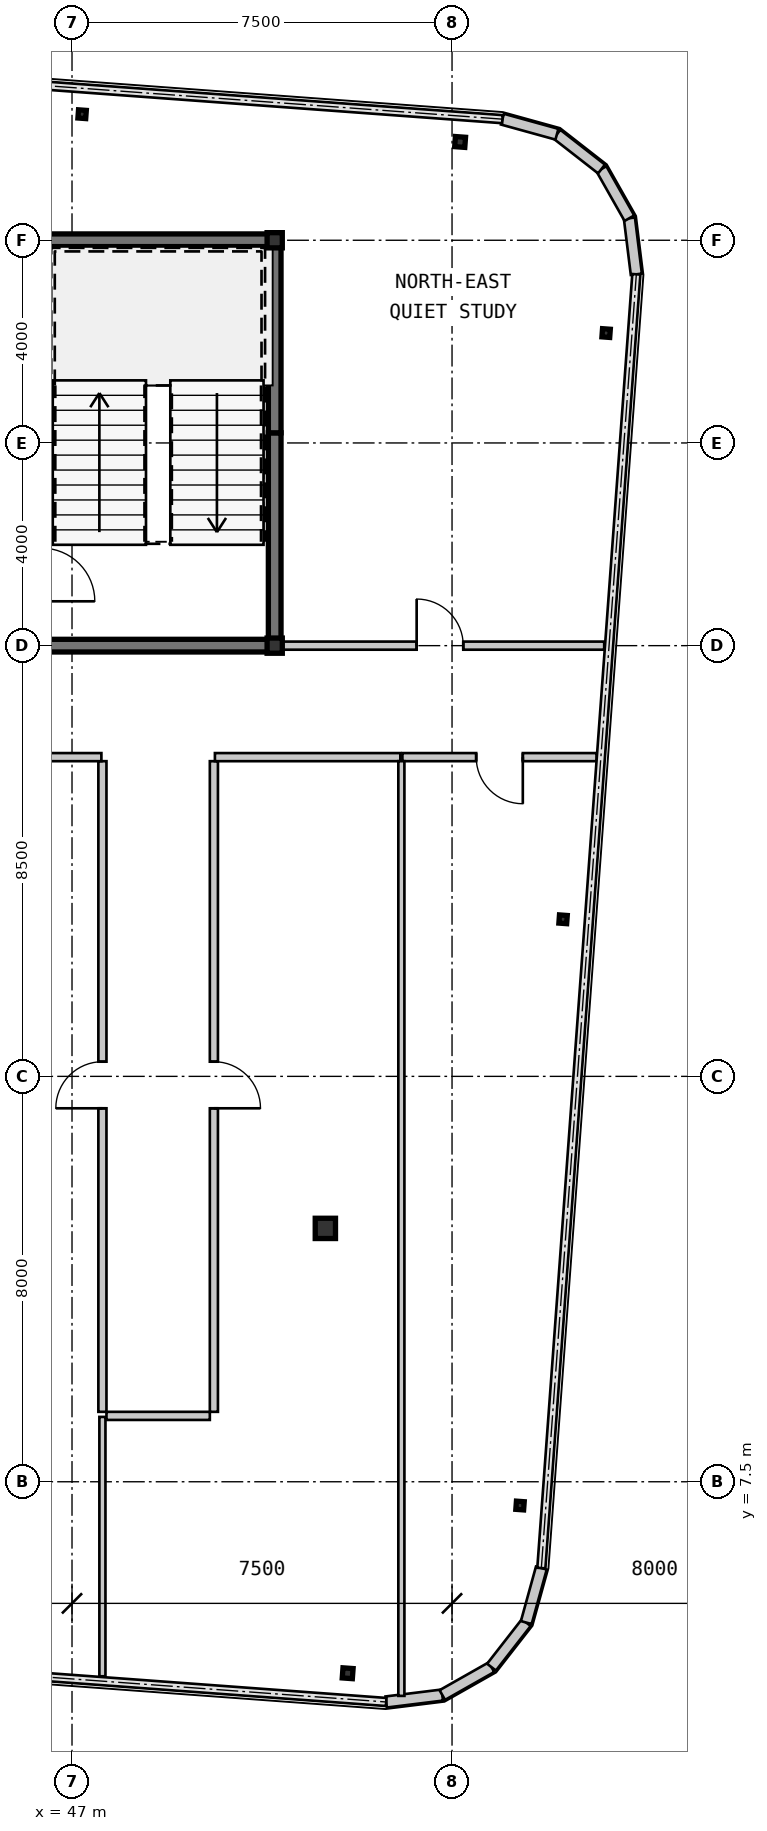
"""IFC4 building model, lengths in metres.
Left out: names, types, materials, properties, quantities, classifications, styles, units other than length and angle.
Written with IfcOpenShell. Run it as: python <this file> out.ifc"""

import sys

from ifc_helpers import new_model, si_unit, direction, frame, frame_2d, origin, origin_2d, place, context, subcontext, project, spatial, rectangle, hollow_rectangle, i_section, extrude, source, transform, mapped, element, fill, save


model = new_model("IFC4")
c1 = context("Model", 3, precision=1e-05, world=origin(), true_north=direction((0.0, 1.0)))
c2 = subcontext(c1, "Body", "Model", "MODEL_VIEW")
j1 = project(units=[si_unit("LENGTHUNIT", "METRE"), si_unit("PLANEANGLEUNIT", "RADIAN")], contexts=[c1])
p1 = place(None, origin())
s1 = spatial("IfcSite", under=j1, at=p1, CompositionType="ELEMENT")
p2 = place(p1, origin())
s2 = spatial("IfcBuilding", under=s1, at=p2, CompositionType="ELEMENT")
p3 = place(p2, frame((0.0, 0.0, 214.55)))
s3 = spatial("IfcBuildingStorey", under=s2, at=p3, CompositionType="ELEMENT", Elevation=214.55)
m1 = source(origin(), c2, "Body", "SweptSolid", [
    extrude(hollow_rectangle(XDim=0.3, YDim=0.3, WallThickness=0.012, at=origin_2d()), origin(), (0.0, 0.0, 1.0), 3.15),
])
for number, where, z_axis, x_axis in (
    (1, (51.0, 24.0, 0.0), (0.0, 0.0, 1.0), (1.0, 0.0, 0.0)),
    (2, (51.0, 32.0, 0.0), (0.0, 0.0, 1.0), (1.0, 0.0, 0.0)),
):
    element("IfcColumn", number, at=place(p3, frame(where, z_axis=z_axis, x_axis=x_axis)), inside=s3, PredefinedType="COLUMN", context=c2, shape_type="MappedRepresentation", body=[
        mapped(m1, transform((0.0, 0.0, 0.0), scale=1.0)),
    ])
m2 = source(origin(), c2, "Body", "SweptSolid", [
    extrude(hollow_rectangle(XDim=0.4, YDim=0.4, WallThickness=0.016, at=origin_2d()), origin(), (0.0, 0.0, 1.0), 3.15),
])
p4 = place(p3, frame((52.0, 12.5, 0.0), z_axis=(0.0, 0.0, 1.0), x_axis=(1.0, 0.0, 0.0)))
e3 = element("IfcColumn", 3, at=p4, inside=s3, PredefinedType="COLUMN", context=c2, shape_type="MappedRepresentation", body=[
    mapped(m2, transform((0.0, 0.0, 0.0), scale=1.0)),
])
m3 = source(origin(), c2, "Body", "SweptSolid", [
    extrude(hollow_rectangle(XDim=0.2, YDim=0.2, WallThickness=0.009, at=origin_2d()), origin(), (0.0, 0.0, 1.0), 3.15),
])
p5 = place(p3, frame((52.44, 3.721, 0.0), z_axis=(0.0, 0.0, 1.0), x_axis=(0.997314477224, -0.073238197128, 0.0)))
e4 = element("IfcColumn", 4, at=p5, inside=s3, PredefinedType="COLUMN", context=c2, shape_type="MappedRepresentation", body=[
    mapped(m3, transform((0.0, 0.0, 0.0), scale=1.0)),
])
m4 = source(origin(), c2, "Body", "SweptSolid", [
    extrude(i_section(OverallWidth=0.154, OverallDepth=0.162, WebThickness=0.008, FlangeThickness=0.011, at=origin_2d()), origin(), (0.0, 0.0, 1.0), 3.15),
])
p6 = place(p3, frame((47.199, 34.488, 0.0), z_axis=(0.0, 0.0, 1.0), x_axis=(0.997314477224, -0.073238197128, 0.0)))
e5 = element("IfcColumn", 5, at=p6, inside=s3, PredefinedType="COLUMN", context=c2, shape_type="MappedRepresentation", body=[
    mapped(m4, transform((0.0, 0.0, 0.0), scale=1.0)),
])
p7 = place(p3, frame((54.659, 33.94, 0.0), z_axis=(0.0, 0.0, 1.0), x_axis=(0.997314477224, -0.073238197128, 0.0)))
e6 = element("IfcColumn", 6, at=p7, inside=s3, PredefinedType="COLUMN", context=c2, shape_type="MappedRepresentation", body=[
    mapped(m3, transform((0.0, 0.0, 0.0), scale=1.0)),
])
for number, where, z_axis, x_axis in (
    (7, (55.842, 7.031, 0.0), (0.0, 0.0, 1.0), (0.997, -0.073, 0.0)),
    (8, (56.691, 18.6, 0.0), (0.0, 0.0, 1.0), (0.997, -0.073, 0.0)),
    (9, (57.541, 30.169, 0.0), (0.0, 0.0, 1.0), (0.997, -0.073, 0.0)),
):
    element("IfcColumn", number, at=place(p3, frame(where, z_axis=z_axis, x_axis=x_axis)), inside=s3, PredefinedType="COLUMN", context=c2, shape_type="MappedRepresentation", body=[
        mapped(m4, transform((0.0, 0.0, 0.0), scale=1.0)),
    ])
m5 = source(origin(), c2, "Body", "SweptSolid", [
    extrude(rectangle(XDim=1.116, YDim=0.22, at=frame_2d((0.558, 0.0))), origin(), (0.0, 0.0, 1.0), 2.93),
])
p8 = place(p3, frame((53.201, 3.154, 0.0), z_axis=(0.0, 0.0, 1.0), x_axis=(0.992438604032, 0.122742076028, 0.0)))
e10 = element("IfcWall", 10, at=p8, inside=s3, PredefinedType="SOLIDWALL", context=c2, shape_type="MappedRepresentation", body=[
    mapped(m5, transform((0.0, 0.0, 0.0), scale=1.0)),
])
m6 = source(origin(), c2, "Body", "SweptSolid", [
    extrude(rectangle(XDim=1.116, YDim=0.22, at=frame_2d((0.558, 0.0))), origin(), (0.0, 0.0, 1.0), 2.93),
])
p9 = place(p3, frame((54.308, 3.291, 0.0), z_axis=(0.0, 0.0, 1.0), x_axis=(0.869893934693, 0.49323882895, 0.0)))
e11 = element("IfcWall", 11, at=p9, inside=s3, PredefinedType="SOLIDWALL", context=c2, shape_type="MappedRepresentation", body=[
    mapped(m6, transform((0.0, 0.0, 0.0), scale=1.0)),
])
for number, where, z_axis, x_axis in (
    (12, (55.279, 3.841, 0.0), (0.0, 0.0, 1.0), (0.615, 0.789, 0.0)),
    (13, (55.965, 4.721, 0.0), (0.0, 0.0, 1.0), (0.266, 0.964, 0.0)),
    (14, (58.137, 31.328, 0.0), (0.0, 0.0, 1.0), (-0.123, 0.992, 0.0)),
):
    element("IfcWall", number, at=place(p3, frame(where, z_axis=z_axis, x_axis=x_axis)), inside=s3, PredefinedType="SOLIDWALL", context=c2, shape_type="MappedRepresentation", body=[
        mapped(m5, transform((0.0, 0.0, 0.0), scale=1.0)),
    ])
m7 = source(origin(), c2, "Body", "SweptSolid", [
    extrude(rectangle(XDim=1.116, YDim=0.22, at=frame_2d((0.558, 0.0))), origin(), (0.0, 0.0, 1.0), 2.93),
])
p10 = place(p3, frame((58.0, 32.436, 0.0), z_axis=(0.0, 0.0, 1.0), x_axis=(-0.493167138628, 0.869934579941, 0.0)))
e15 = element("IfcWall", 15, at=p10, inside=s3, PredefinedType="SOLIDWALL", context=c2, shape_type="MappedRepresentation", body=[
    mapped(m7, transform((0.0, 0.0, 0.0), scale=1.0)),
])
p11 = place(p3, frame((57.45, 33.406, 0.0), z_axis=(0.0, 0.0, 1.0), x_axis=(-0.788597772321, 0.614909386406, 0.0)))
e16 = element("IfcWall", 16, at=p11, inside=s3, PredefinedType="SOLIDWALL", context=c2, shape_type="MappedRepresentation", body=[
    mapped(m5, transform((0.0, 0.0, 0.0), scale=1.0)),
])
p12 = place(p3, frame((56.57, 34.093, 0.0), z_axis=(0.0, 0.0, 1.0), x_axis=(-0.963833843713, 0.266503886865, 0.0)))
e17 = element("IfcWall", 17, at=p12, inside=s3, PredefinedType="SOLIDWALL", context=c2, shape_type="MappedRepresentation", body=[
    mapped(m7, transform((0.0, 0.0, 0.0), scale=1.0)),
])
m8 = source(origin(), c2, "Body", "SweptSolid", [
    extrude(rectangle(XDim=11.925, YDim=0.25, at=frame_2d((5.962, 0.0))), origin(), (0.0, 0.0, 1.0), 2.93),
])
p13 = place(p3, frame((39.2, 32.0, 0.0), z_axis=(0.0, 0.0, 1.0), x_axis=(1.0, 0.0, 0.0)))
e18 = element("IfcWall", 18, at=p13, inside=s3, PredefinedType="SHEAR", context=c2, shape_type="MappedRepresentation", body=[
    mapped(m8, transform((0.0, 0.0, 0.0), scale=1.0)),
])
m9 = source(origin(), c2, "Body", "SweptSolid", [
    extrude(rectangle(XDim=4.075, YDim=0.25, at=frame_2d((2.038, 0.0))), origin(), (0.0, 0.0, 1.0), 2.93),
])
p14 = place(p3, frame((51.0, 24.125, 0.0), z_axis=(0.0, 0.0, 1.0), x_axis=(0.0, 1.0, 0.0)))
e19 = element("IfcWall", 19, at=p14, inside=s3, PredefinedType="SHEAR", context=c2, shape_type="MappedRepresentation", body=[
    mapped(m9, transform((0.0, 0.0, 0.0), scale=1.0)),
])
m10 = source(origin(), c2, "Body", "SweptSolid", [
    extrude(rectangle(XDim=3.675, YDim=0.25, at=frame_2d((1.837, 0.0))), origin(), (0.0, 0.0, 1.0), 2.93),
])
p15 = place(p3, frame((51.0, 28.2, 0.0), z_axis=(0.0, 0.0, 1.0), x_axis=(0.0, 1.0, 0.0)))
e20 = element("IfcWall", 20, at=p15, inside=s3, PredefinedType="SHEAR", context=c2, shape_type="MappedRepresentation", body=[
    mapped(m10, transform((0.0, 0.0, 0.0), scale=1.0)),
])
m11 = source(origin(), c2, "Body", "SweptSolid", [
    extrude(rectangle(XDim=4.85, YDim=0.25, at=frame_2d((2.425, 0.0))), origin(), (0.0, 0.0, 1.0), 2.93),
])
p16 = place(p3, frame((46.275, 24.0, 0.0), z_axis=(0.0, 0.0, 1.0), x_axis=(1.0, 0.0, 0.0)))
e21 = element("IfcWall", 21, at=p16, inside=s3, PredefinedType="SHEAR", context=c2, shape_type="MappedRepresentation", body=[
    mapped(m11, transform((0.0, 0.0, 0.0), scale=1.0)),
])
m12 = source(origin(), c2, "Body", "SweptSolid", [
    extrude(rectangle(XDim=6.378, YDim=0.16, at=frame_2d((3.189, 0.0))), origin(), (0.0, 0.0, 1.0), 2.93),
])
p17 = place(p3, frame((51.125, 24.0, 0.0), z_axis=(0.0, 0.0, 1.0), x_axis=(1.0, 0.0, 0.0)))
e22 = element("IfcWall", 22, at=p17, inside=s3, PredefinedType="PARTITIONING", context=c2, shape_type="MappedRepresentation", body=[
    mapped(m12, transform((0.0, 0.0, 0.0), scale=1.0)),
])
m13 = source(origin(), c2, "Body", "SweptSolid", [
    extrude(rectangle(XDim=0.92, YDim=2.1, at=frame_2d((0.46, 1.05))), frame((0.0, 0.09, 0.0), z_axis=(0.0, -1.0, 0.0), x_axis=(1.0, 0.0, 0.0)), (0.0, 0.0, 1.0), 0.18),
])
p18 = place(p17, frame((2.677, 0.0, 0.0)))
e23 = element("IfcOpeningElement", 23, at=p18, cuts=e22, PredefinedType="OPENING", context=c2, shape_type="MappedRepresentation", body=[
    mapped(m13, transform((0.0, 0.0, 0.0), scale=1.0)),
])
m14 = source(origin(), c2, "Body", "SweptSolid", [
    extrude(rectangle(XDim=12.84, YDim=0.16, at=frame_2d((6.42, 0.0))), origin(), (0.0, 0.0, 1.0), 2.93),
])
p19 = place(p3, frame((47.6, 8.88, 0.0), z_axis=(0.0, 0.0, 1.0), x_axis=(0.0, 1.0, 0.0)))
e24 = element("IfcWall", 24, at=p19, inside=s3, PredefinedType="PARTITIONING", context=c2, shape_type="MappedRepresentation", body=[
    mapped(m14, transform((0.0, 0.0, 0.0), scale=1.0)),
])
p20 = place(p19, frame((5.99, 0.0, 0.0)))
e25 = element("IfcOpeningElement", 25, at=p20, cuts=e24, PredefinedType="OPENING", context=c2, shape_type="MappedRepresentation", body=[
    mapped(m13, transform((0.0, 0.0, 0.0), scale=1.0)),
])
m15 = source(origin(), c2, "Body", "SweptSolid", [
    extrude(rectangle(XDim=6.06, YDim=0.16, at=frame_2d((3.03, 0.0))), origin(), (0.0, 0.0, 1.0), 2.93),
])
p21 = place(p3, frame((47.58, 21.8, 0.0), z_axis=(0.0, 0.0, 1.0), x_axis=(-1.0, 0.0, 0.0)))
e26 = element("IfcWall", 26, at=p21, inside=s3, PredefinedType="PARTITIONING", context=c2, shape_type="MappedRepresentation", body=[
    mapped(m15, transform((0.0, 0.0, 0.0), scale=1.0)),
])
p22 = place(p3, frame((49.8, 21.72, 0.0), z_axis=(0.0, 0.0, 1.0), x_axis=(0.0, -1.0, 0.0)))
e27 = element("IfcWall", 27, at=p22, inside=s3, PredefinedType="PARTITIONING", context=c2, shape_type="MappedRepresentation", body=[
    mapped(m14, transform((0.0, 0.0, 0.0), scale=1.0)),
])
p23 = place(p22, frame((5.93, 0.0, 0.0)))
e28 = element("IfcOpeningElement", 28, at=p23, cuts=e27, PredefinedType="OPENING", context=c2, shape_type="MappedRepresentation", body=[
    mapped(m13, transform((0.0, 0.0, 0.0), scale=1.0)),
])
m16 = source(origin(), c2, "Body", "SweptSolid", [
    extrude(rectangle(XDim=3.659, YDim=0.16, at=frame_2d((1.83, 0.0))), origin(), (0.0, 0.0, 1.0), 2.93),
])
p24 = place(p3, frame((53.48, 21.8, 0.0), z_axis=(0.0, 0.0, 1.0), x_axis=(-1.0, 0.0, 0.0)))
e29 = element("IfcWall", 29, at=p24, inside=s3, PredefinedType="PARTITIONING", context=c2, shape_type="MappedRepresentation", body=[
    mapped(m16, transform((0.0, 0.0, 0.0), scale=1.0)),
])
m17 = source(origin(), c2, "Body", "SweptSolid", [
    extrude(rectangle(XDim=2.04, YDim=0.16, at=frame_2d((1.02, 0.0))), origin(), (0.0, 0.0, 1.0), 2.93),
])
p25 = place(p3, frame((49.72, 8.8, 0.0), z_axis=(0.0, 0.0, 1.0), x_axis=(-1.0, 0.0, 0.0)))
e30 = element("IfcWall", 30, at=p25, inside=s3, PredefinedType="PARTITIONING", context=c2, shape_type="MappedRepresentation", body=[
    mapped(m17, transform((0.0, 0.0, 0.0), scale=1.0)),
])
m18 = source(origin(), c2, "Body", "SweptSolid", [
    extrude(rectangle(XDim=3.833, YDim=0.16, at=frame_2d((1.917, 0.0))), origin(), (0.0, 0.0, 1.0), 2.93),
])
p26 = place(p3, frame((57.353, 21.8, 0.0), z_axis=(0.0, 0.0, 1.0), x_axis=(-1.0, 0.0, 0.0)))
e31 = element("IfcWall", 31, at=p26, inside=s3, PredefinedType="PARTITIONING", context=c2, shape_type="MappedRepresentation", body=[
    mapped(m18, transform((0.0, 0.0, 0.0), scale=1.0)),
])
p27 = place(p26, frame((1.457, 0.0, 0.0)))
e32 = element("IfcOpeningElement", 32, at=p27, cuts=e31, PredefinedType="OPENING", context=c2, shape_type="MappedRepresentation", body=[
    mapped(m13, transform((0.0, 0.0, 0.0), scale=1.0)),
])
m19 = source(origin(), c2, "Body", "SweptSolid", [
    extrude(rectangle(XDim=5.118, YDim=0.12, at=frame_2d((2.559, 0.0))), origin(), (0.0, 0.0, 1.0), 2.93),
])
p28 = place(p3, frame((47.6, 8.78, 0.0), z_axis=(0.0, 0.0, 1.0), x_axis=(0.0, -1.0, 0.0)))
e33 = element("IfcWall", 33, at=p28, inside=s3, PredefinedType="PARTITIONING", context=c2, shape_type="MappedRepresentation", body=[
    mapped(m19, transform((0.0, 0.0, 0.0), scale=1.0)),
])
m20 = source(origin(), c2, "Body", "SweptSolid", [
    extrude(rectangle(XDim=18.446, YDim=0.12, at=frame_2d((9.223, 0.0))), origin(), (0.0, 0.0, 1.0), 2.93),
])
p29 = place(p3, frame((53.5, 21.72, 0.0), z_axis=(0.0, 0.0, 1.0), x_axis=(0.0, -1.0, 0.0)))
e34 = element("IfcWall", 34, at=p29, inside=s3, PredefinedType="PARTITIONING", context=c2, shape_type="MappedRepresentation", body=[
    mapped(m20, transform((0.0, 0.0, 0.0), scale=1.0)),
])
m21 = source(origin(), c2, "Body", "SweptSolid", [
    extrude(rectangle(XDim=0.92, YDim=2.1, at=frame_2d((0.46, 1.05))), frame((0.0, 0.025, 0.0), z_axis=(0.0, -1.0, 0.0), x_axis=(1.0, 0.0, 0.0)), (0.0, 0.0, 1.0), 0.05),
])
p30 = place(p18, origin())
e35 = element("IfcDoor", 35, at=p30, inside=s3, OperationType="SINGLE_SWING_LEFT", PredefinedType="DOOR", context=c2, shape_type="MappedRepresentation", body=[
    mapped(m21, transform((0.0, 0.0, 0.0), scale=1.0)),
])
fill(e23, e35)
p31 = place(p20, origin())
e36 = element("IfcDoor", 36, at=p31, inside=s3, OperationType="SINGLE_SWING_LEFT", PredefinedType="DOOR", context=c2, shape_type="MappedRepresentation", body=[
    mapped(m21, transform((0.0, 0.0, 0.0), scale=1.0)),
])
fill(e25, e36)
p32 = place(p23, origin())
e37 = element("IfcDoor", 37, at=p32, inside=s3, OperationType="SINGLE_SWING_RIGHT", PredefinedType="DOOR", context=c2, shape_type="MappedRepresentation", body=[
    mapped(m21, transform((0.0, 0.0, 0.0), scale=1.0)),
])
fill(e28, e37)
p33 = place(p27, origin())
e38 = element("IfcDoor", 38, at=p33, inside=s3, OperationType="SINGLE_SWING_LEFT", PredefinedType="DOOR", context=c2, shape_type="MappedRepresentation", body=[
    mapped(m21, transform((0.0, 0.0, 0.0), scale=1.0)),
])
fill(e32, e38)
save(model, sys.argv[1])
